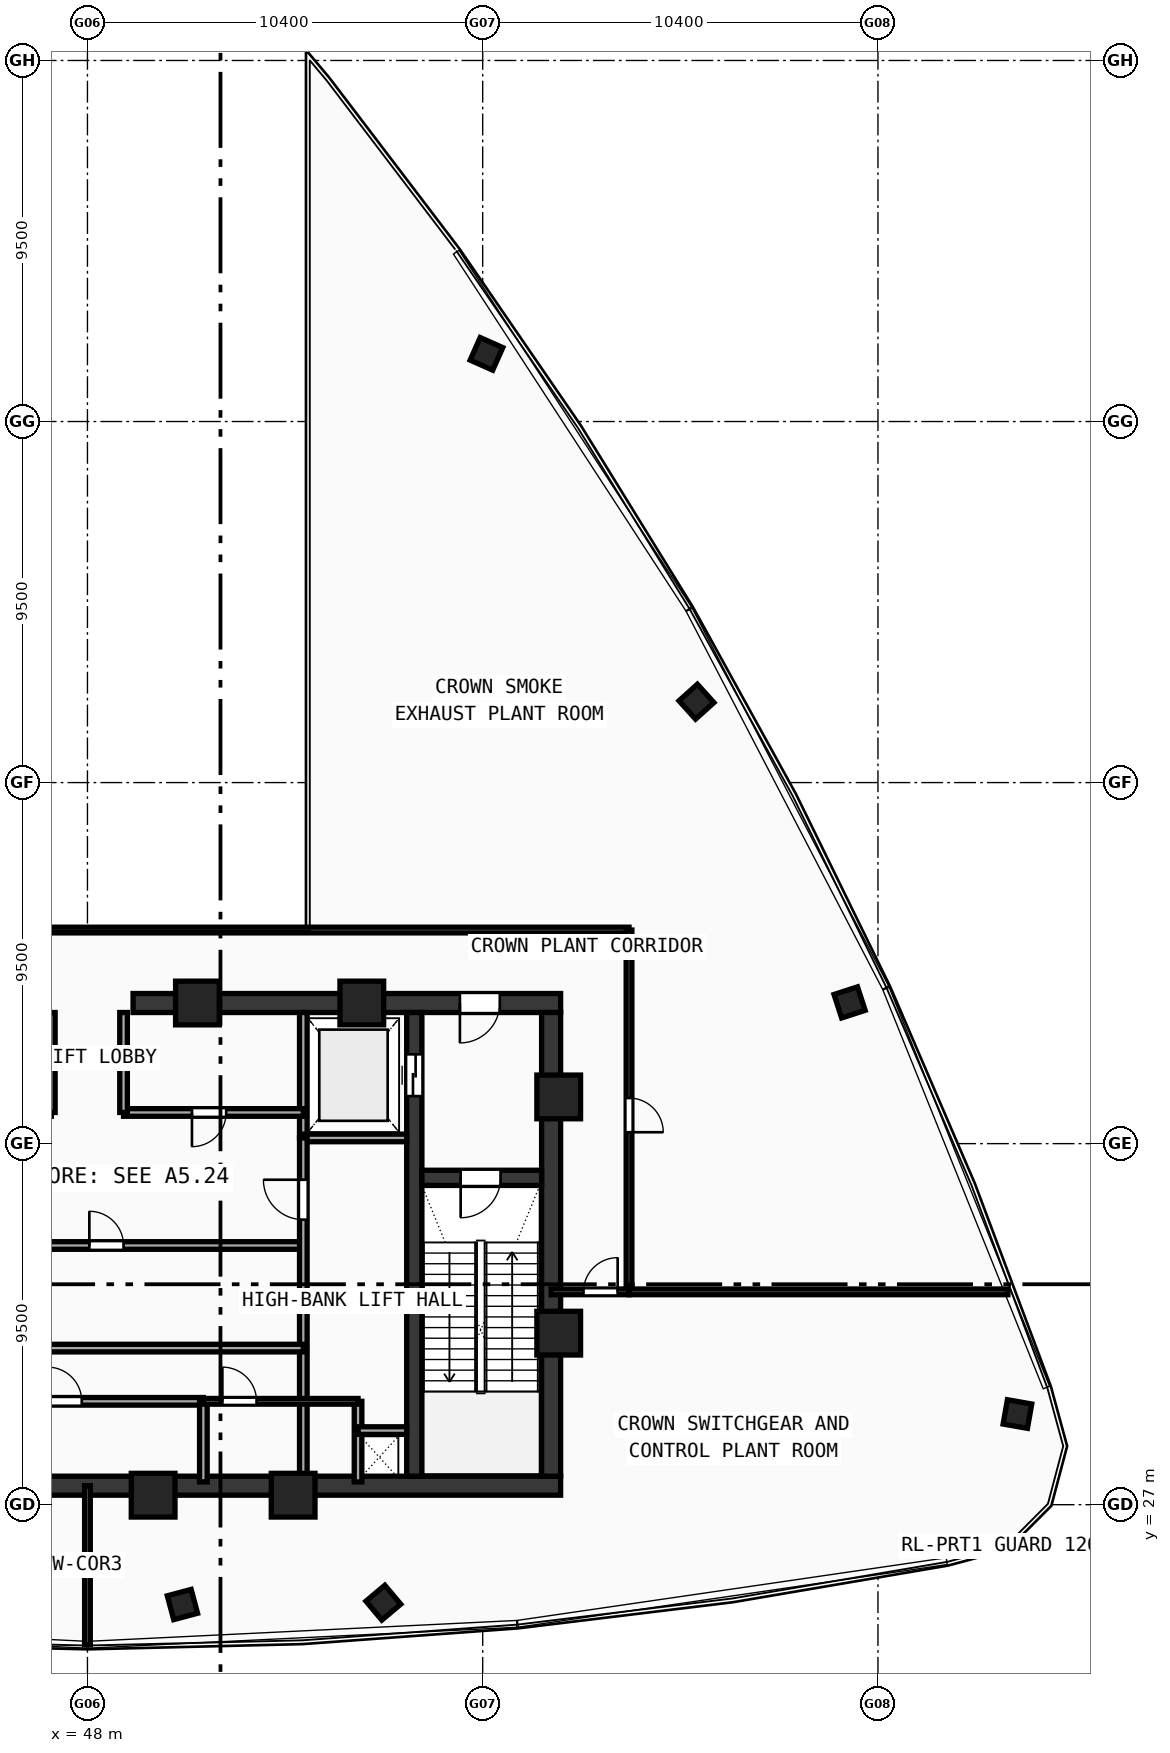
"""IFC4 building model, lengths in metres.
Left out: names, types, materials, properties, quantities, classifications, styles, units other than length and angle.
Written with IfcOpenShell. Run it as: python <this file> out.ifc"""

import sys

from ifc_helpers import new_model, si_unit, direction, frame, frame_2d, origin, origin_with_axes, origin_2d, place, context, subcontext, project, spatial, rectangle, hollow_rectangle, extrude, source, transform, mapped, element, fill, save


model = new_model("IFC4")
c1 = context("Model", 3, precision=1e-05, world=origin(), true_north=direction((0.0, 1.0)))
c2 = subcontext(c1, "Body", "Model", "MODEL_VIEW")
j1 = project(units=[si_unit("LENGTHUNIT", "METRE"), si_unit("PLANEANGLEUNIT", "RADIAN")], contexts=[c1])
p1 = place(None, origin())
s1 = spatial("IfcSite", under=j1, at=p1, CompositionType="ELEMENT")
p2 = place(p1, origin())
s2 = spatial("IfcBuilding", under=s1, at=p2, CompositionType="ELEMENT")
p3 = place(p2, frame((0.0, 0.0, 381.76)))
s3 = spatial("IfcBuildingStorey", under=s2, at=p3, CompositionType="ELEMENT", Elevation=381.76)
p4 = place(p3, frame((35.55, 27.5, 0.0), z_axis=(0.0, 0.0, 1.0), x_axis=(1.0, 0.0, 0.0)))
e1 = element("IfcWall", 1, at=p4, inside=s3, PredefinedType="SHEAR", context=c2, shape_type="SweptSolid", body=[
    extrude(rectangle(XDim=24.9, YDim=0.5, at=frame_2d((12.45, 0.0))), origin(), (0.0, 0.0, 1.0), 4.72),
])
p5 = place(p3, frame((49.2, 40.2, 0.0), z_axis=(0.0, 0.0, 1.0), x_axis=(1.0, 0.0, 0.0)))
e2 = element("IfcWall", 2, at=p5, inside=s3, PredefinedType="SHEAR", context=c2, shape_type="SweptSolid", body=[
    extrude(rectangle(XDim=11.25, YDim=0.5, at=frame_2d((5.625, 0.0))), origin(), (0.0, 0.0, 1.0), 4.72),
])
p6 = place(p5, frame((8.6, 0.0, 0.0)))
e3 = element("IfcOpeningElement", 3, at=p6, cuts=e2, PredefinedType="OPENING", context=c2, shape_type="SweptSolid", body=[
    extrude(rectangle(XDim=1.05, YDim=2.1, at=frame_2d((0.525, 1.05))), frame((0.0, 0.26, 0.0), z_axis=(0.0, -1.0, 0.0), x_axis=(1.0, 0.0, 0.0)), (0.0, 0.0, 1.0), 0.52),
])
p7 = place(p3, frame((60.2, 27.75, 0.0), z_axis=(0.0, 0.0, 1.0), x_axis=(0.0, 1.0, 0.0)))
e4 = element("IfcWall", 4, at=p7, inside=s3, PredefinedType="SHEAR", context=c2, shape_type="SweptSolid", body=[
    extrude(rectangle(XDim=12.2, YDim=0.5, at=frame_2d((6.1, 0.0))), origin(), (0.0, 0.0, 1.0), 4.72),
])
p8 = place(p3, frame((56.6, 27.75, 0.0), z_axis=(0.0, 0.0, 1.0), x_axis=(0.0, 1.0, 0.0)))
e5 = element("IfcWall", 5, at=p8, inside=s3, PredefinedType="SHEAR", context=c2, shape_type="SweptSolid", body=[
    extrude(rectangle(XDim=12.2, YDim=0.4, at=frame_2d((6.1, 0.0))), origin(), (0.0, 0.0, 1.0), 4.72),
])
p9 = place(p8, frame((10.0, 0.0, 0.0)))
e6 = element("IfcOpeningElement", 6, at=p9, cuts=e5, PredefinedType="OPENING", context=c2, shape_type="SweptSolid", body=[
    extrude(rectangle(XDim=1.1, YDim=2.1, at=frame_2d((0.55, 1.05))), frame((0.0, 0.21, 0.0), z_axis=(0.0, -1.0, 0.0), x_axis=(1.0, 0.0, 0.0)), (0.0, 0.0, 1.0), 0.42),
])
p10 = place(p3, frame((56.8, 35.6, 0.0), z_axis=(0.0, 0.0, 1.0), x_axis=(1.0, 0.0, 0.0)))
e7 = element("IfcWall", 7, at=p10, inside=s3, PredefinedType="SHEAR", context=c2, shape_type="SweptSolid", body=[
    extrude(rectangle(XDim=3.15, YDim=0.4, at=frame_2d((1.575, 0.0))), origin(), (0.0, 0.0, 1.0), 4.72),
])
p11 = place(p10, frame((1.02, 0.0, 0.0)))
e8 = element("IfcOpeningElement", 8, at=p11, cuts=e7, PredefinedType="OPENING", context=c2, shape_type="SweptSolid", body=[
    extrude(rectangle(XDim=1.05, YDim=2.1, at=frame_2d((0.525, 1.05))), frame((0.0, 0.21, 0.0), z_axis=(0.0, -1.0, 0.0), x_axis=(1.0, 0.0, 0.0)), (0.0, 0.0, 1.0), 0.42),
])
m1 = source(origin(), c2, "Body", "SweptSolid", [
    extrude(hollow_rectangle(XDim=1.15, YDim=1.15, WallThickness=0.048, at=origin_2d()), origin(), (0.0, 0.0, 1.0), 5.0),
])
for number, where, z_axis, x_axis in (
    (9, (49.729, 27.25, -0.28), (0.0, 0.0, 1.0), (1.0, 0.0, 0.0)),
    (10, (53.412, 27.25, -0.28), (0.0, 0.0, 1.0), (1.0, 0.0, 0.0)),
    (11, (60.4, 31.513, -0.28), (0.0, 0.0, 1.0), (1.0, 0.0, 0.0)),
    (12, (60.4, 37.729, -0.28), (0.0, 0.0, 1.0), (1.0, 0.0, 0.0)),
    (13, (55.219, 40.2, -0.28), (0.0, 0.0, 1.0), (1.0, 0.0, 0.0)),
    (14, (50.894, 40.2, -0.28), (0.0, 0.0, 1.0), (1.0, 0.0, 0.0)),
):
    element("IfcColumn", number, at=place(p3, frame(where, z_axis=z_axis, x_axis=x_axis)), inside=s3, PredefinedType="COLUMN", context=c2, shape_type="MappedRepresentation", body=[
        mapped(m1, transform((0.0, 0.0, 0.0), scale=1.0)),
    ])
m2 = source(origin(), c2, "Body", "SweptSolid", [
    extrude(hollow_rectangle(XDim=0.65, YDim=0.65, WallThickness=0.024, at=origin_2d()), origin(), (0.0, 0.0, 1.0), 5.0),
])
for number, where, z_axis, x_axis in (
    (15, (50.499, 24.373, -0.28), (0.0, 0.0, 1.0), (0.966, 0.259, 0.0)),
    (16, (55.785, 24.422, -0.28), (0.0, 0.0, 1.0), (0.766, 0.643, 0.0)),
    (17, (72.47, 29.385, -0.28), (0.0, 0.0, 1.0), (0.174, 0.985, 0.0)),
    (18, (68.053, 40.216, -0.28), (0.0, 0.0, 1.0), (-0.309, 0.951, 0.0)),
    (19, (64.025, 48.129, -0.28), (0.0, 0.0, 1.0), (-0.669, 0.743, 0.0)),
    (20, (58.499, 57.281, -0.28), (0.0, 0.0, 1.0), (-0.914, 0.407, 0.0)),
):
    element("IfcColumn", number, at=place(p3, frame(where, z_axis=z_axis, x_axis=x_axis)), inside=s3, PredefinedType="COLUMN", context=c2, shape_type="MappedRepresentation", body=[
        mapped(m2, transform((0.0, 0.0, 0.0), scale=1.0)),
    ])
p12 = place(p3, frame((53.68, 36.65, 0.0), z_axis=(0.0, 0.0, 1.0), x_axis=(0.0, 1.0, 0.0)))
e21 = element("IfcWall", 21, at=p12, inside=s3, PredefinedType="SOLIDWALL", context=c2, shape_type="SweptSolid", body=[
    extrude(rectangle(XDim=3.3, YDim=0.2, at=frame_2d((1.65, 0.0))), origin(), (0.0, 0.0, 1.0), 4.72),
])
p13 = place(p3, frame((53.68, 36.65, 0.0), z_axis=(0.0, 0.0, 1.0), x_axis=(1.0, 0.0, 0.0)))
e22 = element("IfcWall", 22, at=p13, inside=s3, PredefinedType="SOLIDWALL", context=c2, shape_type="SweptSolid", body=[
    extrude(rectangle(XDim=2.72, YDim=0.2, at=frame_2d((1.36, 0.0))), origin(), (0.0, 0.0, 1.0), 4.72),
])
p14 = place(p3, frame((48.95, 37.32, 0.0), z_axis=(0.0, 0.0, 1.0), x_axis=(1.0, 0.0, 0.0)))
e23 = element("IfcWall", 23, at=p14, inside=s3, PredefinedType="SOLIDWALL", context=c2, shape_type="SweptSolid", body=[
    extrude(rectangle(XDim=4.73, YDim=0.2, at=frame_2d((2.365, 0.0))), origin(), (0.0, 0.0, 1.0), 4.72),
])
p15 = place(p14, frame((1.8, 0.0, 0.0)))
e24 = element("IfcOpeningElement", 24, at=p15, cuts=e23, PredefinedType="OPENING", context=c2, shape_type="SweptSolid", body=[
    extrude(rectangle(XDim=0.9, YDim=2.1, at=frame_2d((0.45, 1.05))), frame((0.0, 0.11, 0.0), z_axis=(0.0, -1.0, 0.0), x_axis=(1.0, 0.0, 0.0)), (0.0, 0.0, 1.0), 0.22),
])
for number, where, z_axis, x_axis in (
    (25, (47.05, 37.32, 0.0), (0.0, 0.0, 1.0), (0.0, 1.0, 0.0)),
    (26, (48.95, 37.32, 0.0), (0.0, 0.0, 1.0), (0.0, 1.0, 0.0)),
):
    element("IfcWall", number, at=place(p3, frame(where, z_axis=z_axis, x_axis=x_axis)), inside=s3, PredefinedType="SOLIDWALL", context=c2, shape_type="SweptSolid", body=[
        extrude(rectangle(XDim=2.63, YDim=0.2, at=frame_2d((1.315, 0.0))), origin(), (0.0, 0.0, 1.0), 4.72),
    ])
p16 = place(p3, frame((43.85, 33.82, 0.0), z_axis=(0.0, 0.0, 1.0), x_axis=(1.0, 0.0, 0.0)))
e27 = element("IfcWall", 27, at=p16, inside=s3, PredefinedType="SOLIDWALL", context=c2, shape_type="SweptSolid", body=[
    extrude(rectangle(XDim=9.83, YDim=0.2, at=frame_2d((4.915, 0.0))), origin(), (0.0, 0.0, 1.0), 4.72),
])
p17 = place(p16, frame((4.2, 0.0, 0.0)))
e28 = element("IfcOpeningElement", 28, at=p17, cuts=e27, PredefinedType="OPENING", context=c2, shape_type="SweptSolid", body=[
    extrude(rectangle(XDim=0.9, YDim=2.1, at=frame_2d((0.45, 1.05))), frame((0.0, 0.11, 0.0), z_axis=(0.0, -1.0, 0.0), x_axis=(1.0, 0.0, 0.0)), (0.0, 0.0, 1.0), 0.22),
])
p18 = place(p3, frame((53.68, 27.6, 0.0), z_axis=(0.0, 0.0, 1.0), x_axis=(0.0, 1.0, 0.0)))
e29 = element("IfcWall", 29, at=p18, inside=s3, PredefinedType="SOLIDWALL", context=c2, shape_type="SweptSolid", body=[
    extrude(rectangle(XDim=9.05, YDim=0.2, at=frame_2d((4.525, 0.0))), origin(), (0.0, 0.0, 1.0), 4.72),
])
p19 = place(p18, frame((6.9, 0.0, 0.0)))
e30 = element("IfcOpeningElement", 30, at=p19, cuts=e29, PredefinedType="OPENING", context=c2, shape_type="SweptSolid", body=[
    extrude(rectangle(XDim=1.05, YDim=2.1, at=frame_2d((0.525, 1.05))), frame((0.0, 0.11, 0.0), z_axis=(0.0, -1.0, 0.0), x_axis=(1.0, 0.0, 0.0)), (0.0, 0.0, 1.0), 0.22),
])
p20 = place(p3, frame((43.85, 29.72, 0.0), z_axis=(0.0, 0.0, 1.0), x_axis=(1.0, 0.0, 0.0)))
e31 = element("IfcWall", 31, at=p20, inside=s3, PredefinedType="SOLIDWALL", context=c2, shape_type="SweptSolid", body=[
    extrude(rectangle(XDim=7.2, YDim=0.2, at=frame_2d((3.6, 0.0))), origin(), (0.0, 0.0, 1.0), 4.72),
])
p21 = place(p20, frame((3.1, 0.0, 0.0)))
e32 = element("IfcOpeningElement", 32, at=p21, cuts=e31, PredefinedType="OPENING", context=c2, shape_type="SweptSolid", body=[
    extrude(rectangle(XDim=0.9, YDim=2.1, at=frame_2d((0.45, 1.05))), frame((0.0, 0.11, 0.0), z_axis=(0.0, -1.0, 0.0), x_axis=(1.0, 0.0, 0.0)), (0.0, 0.0, 1.0), 0.22),
])
p22 = place(p3, frame((51.05, 27.6, 0.0), z_axis=(0.0, 0.0, 1.0), x_axis=(0.0, 1.0, 0.0)))
e33 = element("IfcWall", 33, at=p22, inside=s3, PredefinedType="SOLIDWALL", context=c2, shape_type="SweptSolid", body=[
    extrude(rectangle(XDim=2.12, YDim=0.2, at=frame_2d((1.06, 0.0))), origin(), (0.0, 0.0, 1.0), 4.72),
])
p23 = place(p3, frame((43.85, 31.12, 0.0), z_axis=(0.0, 0.0, 1.0), x_axis=(1.0, 0.0, 0.0)))
e34 = element("IfcWall", 34, at=p23, inside=s3, PredefinedType="SOLIDWALL", context=c2, shape_type="SweptSolid", body=[
    extrude(rectangle(XDim=9.83, YDim=0.2, at=frame_2d((4.915, 0.0))), origin(), (0.0, 0.0, 1.0), 4.72),
])
p24 = place(p3, frame((55.12, 27.6, 0.0), z_axis=(0.0, 0.0, 1.0), x_axis=(0.0, 1.0, 0.0)))
e35 = element("IfcWall", 35, at=p24, inside=s3, PredefinedType="SOLIDWALL", context=c2, shape_type="SweptSolid", body=[
    extrude(rectangle(XDim=2.12, YDim=0.2, at=frame_2d((1.06, 0.0))), origin(), (0.0, 0.0, 1.0), 4.72),
])
p25 = place(p3, frame((55.12, 28.95, 0.0), z_axis=(0.0, 0.0, 1.0), x_axis=(1.0, 0.0, 0.0)))
e36 = element("IfcWall", 36, at=p25, inside=s3, PredefinedType="SOLIDWALL", context=c2, shape_type="SweptSolid", body=[
    extrude(rectangle(XDim=1.28, YDim=0.2, at=frame_2d((0.64, 0.0))), origin(), (0.0, 0.0, 1.0), 4.72),
])
p26 = place(p3, frame((51.05, 29.72, 0.0), z_axis=(0.0, 0.0, 1.0), x_axis=(1.0, 0.0, 0.0)))
e37 = element("IfcWall", 37, at=p26, inside=s3, PredefinedType="PARTITIONING", context=c2, shape_type="SweptSolid", body=[
    extrude(rectangle(XDim=4.07, YDim=0.15, at=frame_2d((2.035, 0.0))), origin(), (0.0, 0.0, 1.0), 4.72),
])
p27 = place(p26, frame((0.5, 0.0, 0.0)))
e38 = element("IfcOpeningElement", 38, at=p27, cuts=e37, PredefinedType="OPENING", context=c2, shape_type="SweptSolid", body=[
    extrude(rectangle(XDim=0.9, YDim=2.1, at=frame_2d((0.45, 1.05))), frame((0.0, 0.085, 0.0), z_axis=(0.0, -1.0, 0.0), x_axis=(1.0, 0.0, 0.0)), (0.0, 0.0, 1.0), 0.17),
])
p28 = place(p3, frame((48.0, 23.314, 0.0), z_axis=(0.0, 0.0, 1.0), x_axis=(0.0, 1.0, 0.0)))
e39 = element("IfcWall", 39, at=p28, inside=s3, PredefinedType="PARTITIONING", context=c2, shape_type="SweptSolid", body=[
    extrude(rectangle(XDim=4.186, YDim=0.15, at=frame_2d((2.093, 0.0))), origin(), (0.0, 0.0, 1.0), 4.12),
])
p29 = place(p3, frame((35.6, 42.12, 0.0), z_axis=(0.0, 0.0, 1.0), x_axis=(1.0, 0.0, 0.0)))
e40 = element("IfcWall", 40, at=p29, inside=s3, PredefinedType="PARTITIONING", context=c2, shape_type="SweptSolid", body=[
    extrude(rectangle(XDim=26.65, YDim=0.15, at=frame_2d((13.325, 0.0))), origin(), (0.0, 0.0, 1.0), 4.12),
])
p30 = place(p3, frame((62.25, 32.6, 0.0), z_axis=(0.0, 0.0, 1.0), x_axis=(0.0, 1.0, 0.0)))
e41 = element("IfcWall", 41, at=p30, inside=s3, PredefinedType="PARTITIONING", context=c2, shape_type="SweptSolid", body=[
    extrude(rectangle(XDim=9.52, YDim=0.15, at=frame_2d((4.76, 0.0))), origin(), (0.0, 0.0, 1.0), 4.12),
])
p31 = place(p30, frame((4.2, 0.0, 0.0)))
e42 = element("IfcOpeningElement", 42, at=p31, cuts=e41, PredefinedType="OPENING", context=c2, shape_type="SweptSolid", body=[
    extrude(rectangle(XDim=0.9, YDim=2.1, at=frame_2d((0.45, 1.05))), frame((0.0, 0.085, 0.0), z_axis=(0.0, -1.0, 0.0), x_axis=(1.0, 0.0, 0.0)), (0.0, 0.0, 1.0), 0.17),
])
p32 = place(p3, frame((60.2, 32.6, 0.0), z_axis=(0.0, 0.0, 1.0), x_axis=(1.0, 0.0, 0.0)))
e43 = element("IfcWall", 43, at=p32, inside=s3, PredefinedType="PARTITIONING", context=c2, shape_type="SweptSolid", body=[
    extrude(rectangle(XDim=2.05, YDim=0.15, at=frame_2d((1.025, 0.0))), origin(), (0.0, 0.0, 1.0), 4.72),
])
p33 = place(p32, frame((0.851, 0.0, 0.0)))
e44 = element("IfcOpeningElement", 44, at=p33, cuts=e43, PredefinedType="OPENING", context=c2, shape_type="SweptSolid", body=[
    extrude(rectangle(XDim=0.9, YDim=2.1, at=frame_2d((0.45, 1.05))), frame((0.0, 0.085, 0.0), z_axis=(0.0, -1.0, 0.0), x_axis=(1.0, 0.0, 0.0)), (0.0, 0.0, 1.0), 0.17),
])
p34 = place(p3, frame((62.25, 32.6, 0.0), z_axis=(0.0, 0.0, 1.0), x_axis=(1.0, 0.0, 0.0)))
e45 = element("IfcWall", 45, at=p34, inside=s3, PredefinedType="PARTITIONING", context=c2, shape_type="SweptSolid", body=[
    extrude(rectangle(XDim=9.97, YDim=0.15, at=frame_2d((4.985, 0.0))), origin(), (0.0, 0.0, 1.0), 4.12),
])
m3 = source(origin(), c2, "Body", "SweptSolid", [
    extrude(rectangle(XDim=1.05, YDim=2.1, at=frame_2d((0.525, 1.05))), frame((0.0, 0.025, 0.0), z_axis=(0.0, -1.0, 0.0), x_axis=(1.0, 0.0, 0.0)), (0.0, 0.0, 1.0), 0.05),
])
p35 = place(p11, frame((1.05, 0.0, 0.0), z_axis=(0.0, 0.0, 1.0), x_axis=(-1.0, 0.0, 0.0)))
e46 = element("IfcDoor", 46, at=p35, inside=s3, OperationType="SINGLE_SWING_RIGHT", PredefinedType="DOOR", context=c2, shape_type="MappedRepresentation", body=[
    mapped(m3, transform((0.0, 0.0, 0.0), scale=1.0)),
])
fill(e8, e46)
p36 = place(p6, frame((1.05, 0.0, 0.0), z_axis=(0.0, 0.0, 1.0), x_axis=(-1.0, 0.0, 0.0)))
e47 = element("IfcDoor", 47, at=p36, inside=s3, OperationType="SINGLE_SWING_RIGHT", PredefinedType="DOOR", context=c2, shape_type="MappedRepresentation", body=[
    mapped(m3, transform((0.0, 0.0, 0.0), scale=1.0)),
])
fill(e3, e47)
m4 = source(origin(), c2, "Body", "SweptSolid", [
    extrude(rectangle(XDim=1.1, YDim=2.1, at=frame_2d((0.55, 1.05))), frame((0.0, 0.025, 0.0), z_axis=(0.0, -1.0, 0.0), x_axis=(1.0, 0.0, 0.0)), (0.0, 0.0, 1.0), 0.05),
])
p37 = place(p9, origin_with_axes())
e48 = element("IfcDoor", 48, at=p37, inside=s3, OperationType="DOUBLE_DOOR_SLIDING", PredefinedType="DOOR", context=c2, shape_type="MappedRepresentation", body=[
    mapped(m4, transform((0.0, 0.0, 0.0), scale=1.0)),
])
fill(e6, e48)
m5 = source(origin(), c2, "Body", "SweptSolid", [
    extrude(rectangle(XDim=0.9, YDim=2.1, at=frame_2d((0.45, 1.05))), frame((0.0, 0.025, 0.0), z_axis=(0.0, -1.0, 0.0), x_axis=(1.0, 0.0, 0.0)), (0.0, 0.0, 1.0), 0.05),
])
p38 = place(p15, frame((0.9, 0.0, 0.0), z_axis=(0.0, 0.0, 1.0), x_axis=(-1.0, 0.0, 0.0)))
e49 = element("IfcDoor", 49, at=p38, inside=s3, OperationType="SINGLE_SWING_RIGHT", PredefinedType="DOOR", context=c2, shape_type="MappedRepresentation", body=[
    mapped(m5, transform((0.0, 0.0, 0.0), scale=1.0)),
])
fill(e24, e49)
p39 = place(p17, origin_with_axes())
e50 = element("IfcDoor", 50, at=p39, inside=s3, OperationType="SINGLE_SWING_LEFT", PredefinedType="DOOR", context=c2, shape_type="MappedRepresentation", body=[
    mapped(m5, transform((0.0, 0.0, 0.0), scale=1.0)),
])
fill(e28, e50)
p40 = place(p19, origin_with_axes())
e51 = element("IfcDoor", 51, at=p40, inside=s3, OperationType="SINGLE_SWING_RIGHT", PredefinedType="DOOR", context=c2, shape_type="MappedRepresentation", body=[
    mapped(m3, transform((0.0, 0.0, 0.0), scale=1.0)),
])
fill(e30, e51)
p41 = place(p21, origin_with_axes())
e52 = element("IfcDoor", 52, at=p41, inside=s3, OperationType="SINGLE_SWING_LEFT", PredefinedType="DOOR", context=c2, shape_type="MappedRepresentation", body=[
    mapped(m5, transform((0.0, 0.0, 0.0), scale=1.0)),
])
fill(e32, e52)
p42 = place(p27, origin_with_axes())
e53 = element("IfcDoor", 53, at=p42, inside=s3, OperationType="SINGLE_SWING_LEFT", PredefinedType="DOOR", context=c2, shape_type="MappedRepresentation", body=[
    mapped(m5, transform((0.0, 0.0, 0.0), scale=1.0)),
])
fill(e38, e53)
p43 = place(p31, frame((0.9, 0.0, 0.0), z_axis=(0.0, 0.0, 1.0), x_axis=(-1.0, 0.0, 0.0)))
e54 = element("IfcDoor", 54, at=p43, inside=s3, OperationType="SINGLE_SWING_RIGHT", PredefinedType="DOOR", context=c2, shape_type="MappedRepresentation", body=[
    mapped(m5, transform((0.0, 0.0, 0.0), scale=1.0)),
])
fill(e42, e54)
p44 = place(p33, origin_with_axes())
e55 = element("IfcDoor", 55, at=p44, inside=s3, OperationType="SINGLE_SWING_RIGHT", PredefinedType="DOOR", context=c2, shape_type="MappedRepresentation", body=[
    mapped(m5, transform((0.0, 0.0, 0.0), scale=1.0)),
])
fill(e44, e55)
save(model, sys.argv[1])
